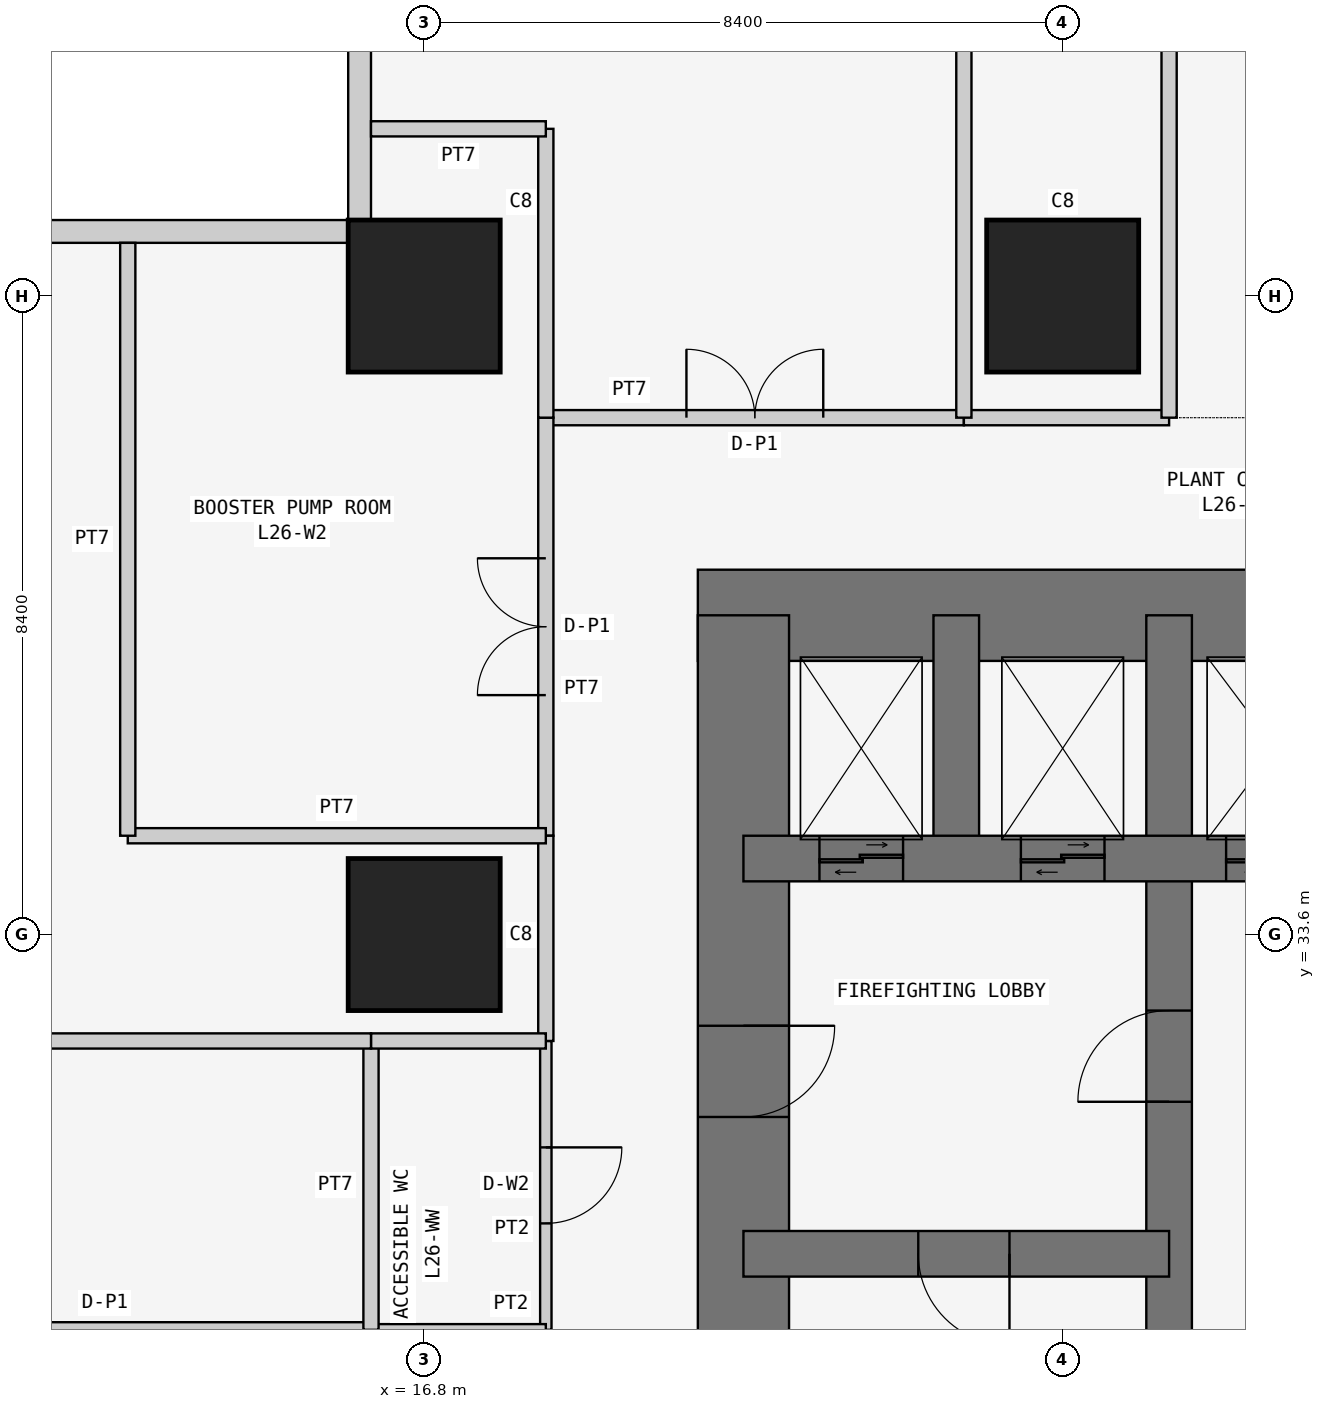
"""IFC4 building model, lengths in metres.
Left out: names, types, materials, properties, quantities, classifications, styles, units other than length and angle.
Written with IfcOpenShell. Run it as: python <this file> out.ifc"""

import sys

from ifc_helpers import new_model, si_unit, direction, frame, frame_2d, origin, origin_2d, place, context, subcontext, project, spatial, rectangle, extrude, element, fill, save


model = new_model("IFC4")
c1 = context("Model", 3, precision=1e-05, world=origin(), true_north=direction((0.0, 1.0)))
c2 = subcontext(c1, "Body", "Model", "MODEL_VIEW")
j1 = project(units=[si_unit("LENGTHUNIT", "METRE"), si_unit("PLANEANGLEUNIT", "RADIAN")], contexts=[c1])
p1 = place(None, origin())
s1 = spatial("IfcSite", under=j1, at=p1, CompositionType="ELEMENT")
p2 = place(p1, origin())
s2 = spatial("IfcBuilding", under=s1, at=p2, CompositionType="ELEMENT")
p3 = place(p2, frame((0.0, 0.0, 102.9)))
s3 = spatial("IfcBuildingStorey", under=s2, at=p3, CompositionType="ELEMENT", Elevation=102.9)
for number, where, z_axis, x_axis in (
    (1, (16.8, 33.6, 0.0), (0.0, 0.0, 1.0), (1.0, 0.0, 0.0)),
    (2, (16.8, 42.0, 0.0), (0.0, 0.0, 1.0), (1.0, 0.0, 0.0)),
    (3, (25.2, 42.0, 0.0), (0.0, 0.0, 1.0), (1.0, 0.0, 0.0)),
):
    element("IfcColumn", number, at=place(p3, frame(where, z_axis=z_axis, x_axis=x_axis)), inside=s3, PredefinedType="COLUMN", context=c2, shape_type="SweptSolid", body=[
        extrude(rectangle(XDim=2.0, YDim=2.0, at=origin_2d()), origin(), (0.0, 0.0, 1.0), 6.0),
    ])
p4 = place(p3, frame((37.8, 37.8, 0.0), z_axis=(0.0, 0.0, 1.0), x_axis=(-1.0, 0.0, 0.0)))
e4 = element("IfcWall", 4, at=p4, inside=s3, PredefinedType="SHEAR", context=c2, shape_type="SweptSolid", body=[
    extrude(rectangle(XDim=17.4, YDim=1.2, at=frame_2d((8.7, 0.0))), origin(), (0.0, 0.0, 1.0), 6.0),
])
p5 = place(p3, frame((21.0, 37.8, 0.0), z_axis=(0.0, 0.0, 1.0), x_axis=(0.0, -1.0, 0.0)))
e5 = element("IfcWall", 5, at=p5, inside=s3, PredefinedType="SHEAR", context=c2, shape_type="SweptSolid", body=[
    extrude(rectangle(XDim=17.4, YDim=1.2, at=frame_2d((8.7, 0.0))), origin(), (0.0, 0.0, 1.0), 6.0),
])
p6 = place(p5, frame((5.4, 0.0, 0.0)))
e6 = element("IfcOpeningElement", 6, at=p6, cuts=e5, PredefinedType="OPENING", context=c2, shape_type="SweptSolid", body=[
    extrude(rectangle(XDim=1.2, YDim=2.1, at=frame_2d((0.6, 1.05))), frame((0.0, 0.61, 0.0), z_axis=(0.0, -1.0, 0.0), x_axis=(1.0, 0.0, 0.0)), (0.0, 0.0, 1.0), 1.22),
])
p7 = place(p3, frame((26.6, 21.0, 0.0), z_axis=(0.0, 0.0, 1.0), x_axis=(0.0, 1.0, 0.0)))
e7 = element("IfcWall", 7, at=p7, inside=s3, PredefinedType="SHEAR", context=c2, shape_type="SweptSolid", body=[
    extrude(rectangle(XDim=16.8, YDim=0.6, at=frame_2d((8.4, 0.0))), origin(), (0.0, 0.0, 1.0), 6.0),
])
p8 = place(p7, frame((10.4, 0.0, 0.0)))
e8 = element("IfcOpeningElement", 8, at=p8, cuts=e7, PredefinedType="OPENING", context=c2, shape_type="SweptSolid", body=[
    extrude(rectangle(XDim=1.2, YDim=2.1, at=frame_2d((0.6, 1.05))), frame((0.0, 0.31, 0.0), z_axis=(0.0, -1.0, 0.0), x_axis=(1.0, 0.0, 0.0)), (0.0, 0.0, 1.0), 0.62),
])
p9 = place(p3, frame((21.0, 29.4, 0.0), z_axis=(0.0, 0.0, 1.0), x_axis=(1.0, 0.0, 0.0)))
e9 = element("IfcWall", 9, at=p9, inside=s3, PredefinedType="SHEAR", context=c2, shape_type="SweptSolid", body=[
    extrude(rectangle(XDim=5.6, YDim=0.6, at=frame_2d((2.8, 0.0))), origin(), (0.0, 0.0, 1.0), 6.0),
])
p10 = place(p9, frame((2.3, 0.0, 0.0)))
e10 = element("IfcOpeningElement", 10, at=p10, cuts=e9, PredefinedType="OPENING", context=c2, shape_type="SweptSolid", body=[
    extrude(rectangle(XDim=1.2, YDim=2.1, at=frame_2d((0.6, 1.05))), frame((0.0, 0.31, 0.0), z_axis=(0.0, -1.0, 0.0), x_axis=(1.0, 0.0, 0.0)), (0.0, 0.0, 1.0), 0.62),
])
p11 = place(p3, frame((21.0, 34.6, 0.0), z_axis=(0.0, 0.0, 1.0), x_axis=(1.0, 0.0, 0.0)))
e11 = element("IfcWall", 11, at=p11, inside=s3, PredefinedType="SHEAR", context=c2, shape_type="SweptSolid", body=[
    extrude(rectangle(XDim=11.2, YDim=0.6, at=frame_2d((5.6, 0.0))), origin(), (0.0, 0.0, 1.0), 6.0),
])
p12 = place(p11, frame((9.35, 0.0, 0.0)))
e12 = element("IfcOpeningElement", 12, at=p12, cuts=e11, PredefinedType="OPENING", context=c2, shape_type="SweptSolid", body=[
    extrude(rectangle(XDim=0.9, YDim=2.1, at=frame_2d((0.45, 1.05))), frame((0.0, 0.31, 0.0), z_axis=(0.0, -1.0, 0.0), x_axis=(1.0, 0.0, 0.0)), (0.0, 0.0, 1.0), 0.62),
])
p13 = place(p11, frame((1.0, 0.0, 0.0)))
e13 = element("IfcOpeningElement", 13, at=p13, cuts=e11, PredefinedType="OPENING", context=c2, shape_type="SweptSolid", body=[
    extrude(rectangle(XDim=1.1, YDim=2.1, at=frame_2d((0.55, 1.05))), frame((0.0, 0.31, 0.0), z_axis=(0.0, -1.0, 0.0), x_axis=(1.0, 0.0, 0.0)), (0.0, 0.0, 1.0), 0.62),
])
p14 = place(p11, frame((3.65, 0.0, 0.0)))
e14 = element("IfcOpeningElement", 14, at=p14, cuts=e11, PredefinedType="OPENING", context=c2, shape_type="SweptSolid", body=[
    extrude(rectangle(XDim=1.1, YDim=2.1, at=frame_2d((0.55, 1.05))), frame((0.0, 0.31, 0.0), z_axis=(0.0, -1.0, 0.0), x_axis=(1.0, 0.0, 0.0)), (0.0, 0.0, 1.0), 0.62),
])
p15 = place(p11, frame((6.35, 0.0, 0.0)))
e15 = element("IfcOpeningElement", 15, at=p15, cuts=e11, PredefinedType="OPENING", context=c2, shape_type="SweptSolid", body=[
    extrude(rectangle(XDim=1.3, YDim=2.1, at=frame_2d((0.65, 1.05))), frame((0.0, 0.31, 0.0), z_axis=(0.0, -1.0, 0.0), x_axis=(1.0, 0.0, 0.0)), (0.0, 0.0, 1.0), 0.62),
])
p16 = place(p3, frame((23.8, 34.6, 0.0), z_axis=(0.0, 0.0, 1.0), x_axis=(0.0, 1.0, 0.0)))
e16 = element("IfcWall", 16, at=p16, inside=s3, PredefinedType="SHEAR", context=c2, shape_type="SweptSolid", body=[
    extrude(rectangle(XDim=3.2, YDim=0.6, at=frame_2d((1.6, 0.0))), origin(), (0.0, 0.0, 1.0), 6.0),
])
p17 = place(p3, frame((15.8, 42.85, 0.0), z_axis=(0.0, 0.0, 1.0), x_axis=(-1.0, 0.0, 0.0)))
e17 = element("IfcWall", 17, at=p17, inside=s3, PredefinedType="SOLIDWALL", context=c2, shape_type="SweptSolid", body=[
    extrude(rectangle(XDim=15.4, YDim=0.3, at=frame_2d((7.7, 0.0))), origin(), (0.0, 0.0, 1.0), 5.85),
])
p18 = place(p3, frame((15.95, 58.4, 0.0), z_axis=(0.0, 0.0, 1.0), x_axis=(0.0, -1.0, 0.0)))
e18 = element("IfcWall", 18, at=p18, inside=s3, PredefinedType="SOLIDWALL", context=c2, shape_type="SweptSolid", body=[
    extrude(rectangle(XDim=15.7, YDim=0.3, at=frame_2d((7.85, 0.0))), origin(), (0.0, 0.0, 1.0), 5.85),
])
p19 = place(p3, frame((18.4, 40.4, 0.0), z_axis=(0.0, 0.0, 1.0), x_axis=(1.0, 0.0, 0.0)))
e19 = element("IfcWall", 19, at=p19, inside=s3, PredefinedType="PARTITIONING", context=c2, shape_type="SweptSolid", body=[
    extrude(rectangle(XDim=5.5, YDim=0.2, at=frame_2d((2.75, 0.0))), origin(), (0.0, 0.0, 1.0), 5.85),
])
p20 = place(p19, frame((1.85, 0.0, 0.0)))
e20 = element("IfcOpeningElement", 20, at=p20, cuts=e19, PredefinedType="OPENING", context=c2, shape_type="SweptSolid", body=[
    extrude(rectangle(XDim=1.8, YDim=2.4, at=frame_2d((0.9, 1.2))), frame((0.0, 0.11, 0.0), z_axis=(0.0, -1.0, 0.0), x_axis=(1.0, 0.0, 0.0)), (0.0, 0.0, 1.0), 0.22),
])
p21 = place(p3, frame((23.9, 40.4, 0.0), z_axis=(0.0, 0.0, 1.0), x_axis=(1.0, 0.0, 0.0)))
e21 = element("IfcWall", 21, at=p21, inside=s3, PredefinedType="PARTITIONING", context=c2, shape_type="SweptSolid", body=[
    extrude(rectangle(XDim=2.7, YDim=0.2, at=frame_2d((1.35, 0.0))), origin(), (0.0, 0.0, 1.0), 5.85),
])
p22 = place(p3, frame((18.4, 34.9, 0.0), z_axis=(0.0, 0.0, 1.0), x_axis=(0.0, 1.0, 0.0)))
e22 = element("IfcWall", 22, at=p22, inside=s3, PredefinedType="PARTITIONING", context=c2, shape_type="SweptSolid", body=[
    extrude(rectangle(XDim=5.5, YDim=0.2, at=frame_2d((2.75, 0.0))), origin(), (0.0, 0.0, 1.0), 5.85),
])
p23 = place(p22, frame((1.85, 0.0, 0.0)))
e23 = element("IfcOpeningElement", 23, at=p23, cuts=e22, PredefinedType="OPENING", context=c2, shape_type="SweptSolid", body=[
    extrude(rectangle(XDim=1.8, YDim=2.4, at=frame_2d((0.9, 1.2))), frame((0.0, 0.11, 0.0), z_axis=(0.0, -1.0, 0.0), x_axis=(1.0, 0.0, 0.0)), (0.0, 0.0, 1.0), 0.22),
])
p24 = place(p3, frame((18.4, 28.4, 0.0), z_axis=(0.0, 0.0, 1.0), x_axis=(0.0, 1.0, 0.0)))
e24 = element("IfcWall", 24, at=p24, inside=s3, PredefinedType="PARTITIONING", context=c2, shape_type="SweptSolid", body=[
    extrude(rectangle(XDim=3.8, YDim=0.15, at=frame_2d((1.9, 0.0))), origin(), (0.0, 0.0, 1.0), 5.85),
])
p25 = place(p24, frame((1.4, 0.0, 0.0)))
e25 = element("IfcOpeningElement", 25, at=p25, cuts=e24, PredefinedType="OPENING", context=c2, shape_type="SweptSolid", body=[
    extrude(rectangle(XDim=1.0, YDim=2.1, at=frame_2d((0.5, 1.05))), frame((0.0, 0.085, 0.0), z_axis=(0.0, -1.0, 0.0), x_axis=(1.0, 0.0, 0.0)), (0.0, 0.0, 1.0), 0.17),
])
p26 = place(p3, frame((18.4, 32.2, 0.0), z_axis=(0.0, 0.0, 1.0), x_axis=(0.0, 1.0, 0.0)))
e26 = element("IfcWall", 26, at=p26, inside=s3, PredefinedType="PARTITIONING", context=c2, shape_type="SweptSolid", body=[
    extrude(rectangle(XDim=2.7, YDim=0.2, at=frame_2d((1.35, 0.0))), origin(), (0.0, 0.0, 1.0), 5.85),
])
p27 = place(p3, frame((23.9, 55.9, 0.0), z_axis=(0.0, 0.0, 1.0), x_axis=(0.0, -1.0, 0.0)))
e27 = element("IfcWall", 27, at=p27, inside=s3, PredefinedType="PARTITIONING", context=c2, shape_type="SweptSolid", body=[
    extrude(rectangle(XDim=15.5, YDim=0.2, at=frame_2d((7.75, 0.0))), origin(), (0.0, 0.0, 1.0), 5.75),
])
p28 = place(p3, frame((18.4, 40.4, 0.0), z_axis=(0.0, 0.0, 1.0), x_axis=(0.0, 1.0, 0.0)))
e28 = element("IfcWall", 28, at=p28, inside=s3, PredefinedType="PARTITIONING", context=c2, shape_type="SweptSolid", body=[
    extrude(rectangle(XDim=3.8, YDim=0.2, at=frame_2d((1.9, 0.0))), origin(), (0.0, 0.0, 1.0), 5.85),
])
p29 = place(p3, frame((18.4, 44.2, 0.0), z_axis=(0.0, 0.0, 1.0), x_axis=(-1.0, 0.0, 0.0)))
e29 = element("IfcWall", 29, at=p29, inside=s3, PredefinedType="PARTITIONING", context=c2, shape_type="SweptSolid", body=[
    extrude(rectangle(XDim=2.3, YDim=0.2, at=frame_2d((1.15, 0.0))), origin(), (0.0, 0.0, 1.0), 5.85),
])
p30 = place(p3, frame((26.6, 40.4, 0.0), z_axis=(0.0, 0.0, 1.0), x_axis=(0.0, 1.0, 0.0)))
e30 = element("IfcWall", 30, at=p30, inside=s3, PredefinedType="PARTITIONING", context=c2, shape_type="SweptSolid", body=[
    extrude(rectangle(XDim=15.0, YDim=0.2, at=frame_2d((7.5, 0.0))), origin(), (0.0, 0.0, 1.0), 5.75),
])
p31 = place(p30, frame((5.4, 0.0, 0.0)))
e31 = element("IfcOpeningElement", 31, at=p31, cuts=e30, PredefinedType="OPENING", context=c2, shape_type="SweptSolid", body=[
    extrude(rectangle(XDim=1.8, YDim=2.4, at=frame_2d((0.9, 1.2))), frame((0.0, 0.11, 0.0), z_axis=(0.0, -1.0, 0.0), x_axis=(1.0, 0.0, 0.0)), (0.0, 0.0, 1.0), 0.22),
])
p32 = place(p3, frame((18.4, 34.9, 0.0), z_axis=(0.0, 0.0, 1.0), x_axis=(-1.0, 0.0, 0.0)))
e32 = element("IfcWall", 32, at=p32, inside=s3, PredefinedType="PARTITIONING", context=c2, shape_type="SweptSolid", body=[
    extrude(rectangle(XDim=5.5, YDim=0.2, at=frame_2d((2.75, 0.0))), origin(), (0.0, 0.0, 1.0), 5.85),
])
p33 = place(p3, frame((12.9, 34.9, 0.0), z_axis=(0.0, 0.0, 1.0), x_axis=(0.0, 1.0, 0.0)))
e33 = element("IfcWall", 33, at=p33, inside=s3, PredefinedType="PARTITIONING", context=c2, shape_type="SweptSolid", body=[
    extrude(rectangle(XDim=7.8, YDim=0.2, at=frame_2d((3.9, 0.0))), origin(), (0.0, 0.0, 1.0), 5.85),
])
p34 = place(p3, frame((16.1, 28.4, 0.0), z_axis=(0.0, 0.0, 1.0), x_axis=(1.0, 0.0, 0.0)))
e34 = element("IfcWall", 34, at=p34, inside=s3, PredefinedType="PARTITIONING", context=c2, shape_type="SweptSolid", body=[
    extrude(rectangle(XDim=2.3, YDim=0.15, at=frame_2d((1.15, 0.0))), origin(), (0.0, 0.0, 1.0), 5.85),
])
p35 = place(p3, frame((1.9, 28.4, 0.0), z_axis=(0.0, 0.0, 1.0), x_axis=(1.0, 0.0, 0.0)))
e35 = element("IfcWall", 35, at=p35, inside=s3, PredefinedType="PARTITIONING", context=c2, shape_type="SweptSolid", body=[
    extrude(rectangle(XDim=14.2, YDim=0.2, at=frame_2d((7.1, 0.0))), origin(), (0.0, 0.0, 1.0), 5.85),
])
p36 = place(p35, frame((9.8, 0.0, 0.0)))
e36 = element("IfcOpeningElement", 36, at=p36, cuts=e35, PredefinedType="OPENING", context=c2, shape_type="SweptSolid", body=[
    extrude(rectangle(XDim=1.8, YDim=2.4, at=frame_2d((0.9, 1.2))), frame((0.0, 0.11, 0.0), z_axis=(0.0, -1.0, 0.0), x_axis=(1.0, 0.0, 0.0)), (0.0, 0.0, 1.0), 0.22),
])
p37 = place(p3, frame((16.1, 28.4, 0.0), z_axis=(0.0, 0.0, 1.0), x_axis=(0.0, 1.0, 0.0)))
e37 = element("IfcWall", 37, at=p37, inside=s3, PredefinedType="PARTITIONING", context=c2, shape_type="SweptSolid", body=[
    extrude(rectangle(XDim=3.8, YDim=0.2, at=frame_2d((1.9, 0.0))), origin(), (0.0, 0.0, 1.0), 5.85),
])
p38 = place(p3, frame((16.1, 32.2, 0.0), z_axis=(0.0, 0.0, 1.0), x_axis=(1.0, 0.0, 0.0)))
e38 = element("IfcWall", 38, at=p38, inside=s3, PredefinedType="PARTITIONING", context=c2, shape_type="SweptSolid", body=[
    extrude(rectangle(XDim=2.3, YDim=0.2, at=frame_2d((1.15, 0.0))), origin(), (0.0, 0.0, 1.0), 5.85),
])
p39 = place(p3, frame((1.9, 32.2, 0.0), z_axis=(0.0, 0.0, 1.0), x_axis=(1.0, 0.0, 0.0)))
e39 = element("IfcWall", 39, at=p39, inside=s3, PredefinedType="PARTITIONING", context=c2, shape_type="SweptSolid", body=[
    extrude(rectangle(XDim=14.2, YDim=0.2, at=frame_2d((7.1, 0.0))), origin(), (0.0, 0.0, 1.0), 5.85),
])
p40 = place(p20, origin())
e40 = element("IfcDoor", 40, at=p40, inside=s3, OperationType="DOUBLE_DOOR_SINGLE_SWING", PredefinedType="DOOR", context=c2, shape_type="SweptSolid", body=[
    extrude(rectangle(XDim=1.8, YDim=2.4, at=frame_2d((0.9, 1.2))), frame((0.0, 0.025, 0.0), z_axis=(0.0, -1.0, 0.0), x_axis=(1.0, 0.0, 0.0)), (0.0, 0.0, 1.0), 0.05),
])
fill(e20, e40)
p41 = place(p23, origin())
e41 = element("IfcDoor", 41, at=p41, inside=s3, OperationType="DOUBLE_DOOR_SINGLE_SWING", PredefinedType="DOOR", context=c2, shape_type="SweptSolid", body=[
    extrude(rectangle(XDim=1.8, YDim=2.4, at=frame_2d((0.9, 1.2))), frame((0.0, 0.025, 0.0), z_axis=(0.0, -1.0, 0.0), x_axis=(1.0, 0.0, 0.0)), (0.0, 0.0, 1.0), 0.05),
])
fill(e23, e41)
p42 = place(p25, frame((1.0, 0.0, 0.0), z_axis=(0.0, 0.0, 1.0), x_axis=(-1.0, 0.0, 0.0)))
e42 = element("IfcDoor", 42, at=p42, inside=s3, OperationType="SINGLE_SWING_LEFT", PredefinedType="DOOR", context=c2, shape_type="SweptSolid", body=[
    extrude(rectangle(XDim=1.0, YDim=2.1, at=frame_2d((0.5, 1.05))), frame((0.0, 0.025, 0.0), z_axis=(0.0, -1.0, 0.0), x_axis=(1.0, 0.0, 0.0)), (0.0, 0.0, 1.0), 0.05),
])
fill(e25, e42)
p43 = place(p36, frame((1.8, 0.0, 0.0), z_axis=(0.0, 0.0, 1.0), x_axis=(-1.0, 0.0, 0.0)))
e43 = element("IfcDoor", 43, at=p43, inside=s3, OperationType="DOUBLE_DOOR_SINGLE_SWING", PredefinedType="DOOR", context=c2, shape_type="SweptSolid", body=[
    extrude(rectangle(XDim=1.8, YDim=2.4, at=frame_2d((0.9, 1.2))), frame((0.0, 0.025, 0.0), z_axis=(0.0, -1.0, 0.0), x_axis=(1.0, 0.0, 0.0)), (0.0, 0.0, 1.0), 0.05),
])
fill(e36, e43)
p44 = place(p6, origin())
e44 = element("IfcDoor", 44, at=p44, inside=s3, OperationType="SINGLE_SWING_LEFT", PredefinedType="DOOR", context=c2, shape_type="SweptSolid", body=[
    extrude(rectangle(XDim=1.2, YDim=2.1, at=frame_2d((0.6, 1.05))), frame((0.0, 0.025, 0.0), z_axis=(0.0, -1.0, 0.0), x_axis=(1.0, 0.0, 0.0)), (0.0, 0.0, 1.0), 0.05),
])
fill(e6, e44)
p45 = place(p10, frame((1.2, 0.0, 0.0), z_axis=(0.0, 0.0, 1.0), x_axis=(-1.0, 0.0, 0.0)))
e45 = element("IfcDoor", 45, at=p45, inside=s3, OperationType="SINGLE_SWING_LEFT", PredefinedType="DOOR", context=c2, shape_type="SweptSolid", body=[
    extrude(rectangle(XDim=1.2, YDim=2.1, at=frame_2d((0.6, 1.05))), frame((0.0, 0.025, 0.0), z_axis=(0.0, -1.0, 0.0), x_axis=(1.0, 0.0, 0.0)), (0.0, 0.0, 1.0), 0.05),
])
fill(e10, e45)
p46 = place(p8, origin())
e46 = element("IfcDoor", 46, at=p46, inside=s3, OperationType="SINGLE_SWING_LEFT", PredefinedType="DOOR", context=c2, shape_type="SweptSolid", body=[
    extrude(rectangle(XDim=1.2, YDim=2.1, at=frame_2d((0.6, 1.05))), frame((0.0, 0.025, 0.0), z_axis=(0.0, -1.0, 0.0), x_axis=(1.0, 0.0, 0.0)), (0.0, 0.0, 1.0), 0.05),
])
fill(e8, e46)
p47 = place(p13, origin())
e47 = element("IfcDoor", 47, at=p47, inside=s3, OperationType="DOUBLE_DOOR_SLIDING", PredefinedType="DOOR", context=c2, shape_type="SweptSolid", body=[
    extrude(rectangle(XDim=1.1, YDim=2.1, at=frame_2d((0.55, 1.05))), frame((0.0, 0.025, 0.0), z_axis=(0.0, -1.0, 0.0), x_axis=(1.0, 0.0, 0.0)), (0.0, 0.0, 1.0), 0.05),
])
fill(e13, e47)
p48 = place(p14, origin())
e48 = element("IfcDoor", 48, at=p48, inside=s3, OperationType="DOUBLE_DOOR_SLIDING", PredefinedType="DOOR", context=c2, shape_type="SweptSolid", body=[
    extrude(rectangle(XDim=1.1, YDim=2.1, at=frame_2d((0.55, 1.05))), frame((0.0, 0.025, 0.0), z_axis=(0.0, -1.0, 0.0), x_axis=(1.0, 0.0, 0.0)), (0.0, 0.0, 1.0), 0.05),
])
fill(e14, e48)
p49 = place(p15, origin())
e49 = element("IfcDoor", 49, at=p49, inside=s3, OperationType="DOUBLE_DOOR_SLIDING", PredefinedType="DOOR", context=c2, shape_type="SweptSolid", body=[
    extrude(rectangle(XDim=1.3, YDim=2.1, at=frame_2d((0.65, 1.05))), frame((0.0, 0.025, 0.0), z_axis=(0.0, -1.0, 0.0), x_axis=(1.0, 0.0, 0.0)), (0.0, 0.0, 1.0), 0.05),
])
fill(e15, e49)
save(model, sys.argv[1])
